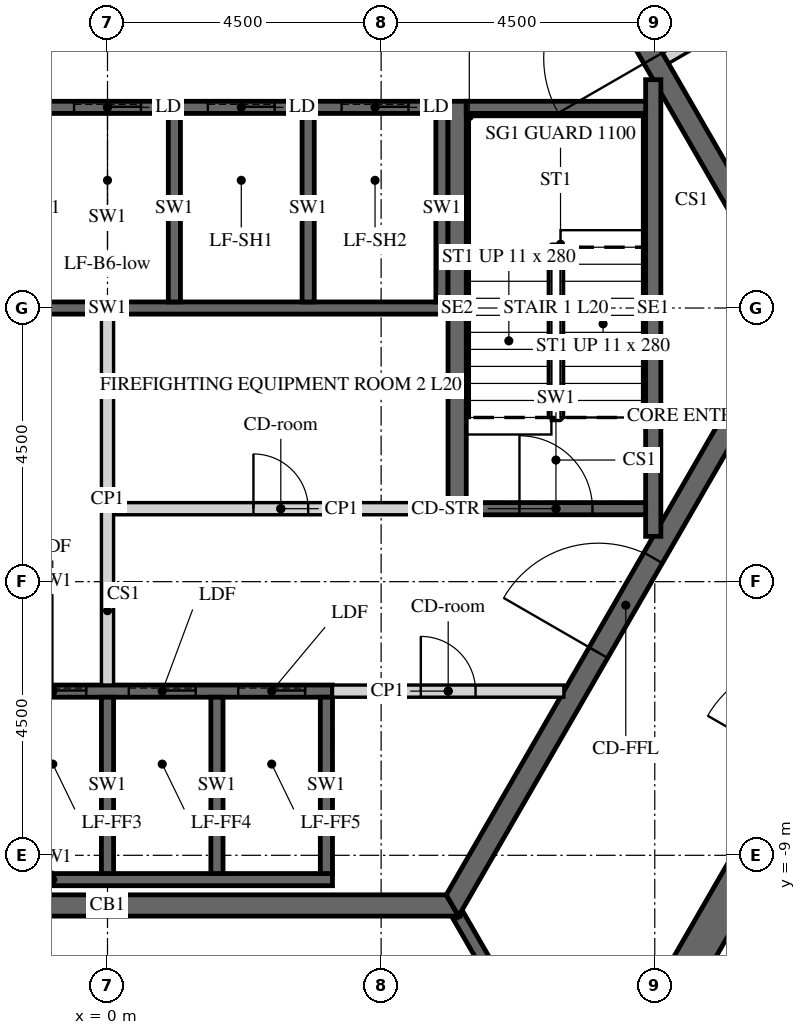
"""IFC4 building model, lengths in metres.
Left out: names, types, materials, properties, quantities, classifications, styles, units other than length and angle.
Written with IfcOpenShell. Run it as: python <this file> out.ifc"""

import sys

from ifc_helpers import new_model, si_unit, direction, frame, frame_2d, origin, place, context, subcontext, project, spatial, polyline, rectangle, outline, extrude, element, fill, save


model = new_model("IFC4")
c1 = context("Model", 3, precision=1e-05, world=origin(), true_north=direction((0.0, 1.0)))
c2 = subcontext(c1, "Body", "Model", "MODEL_VIEW")
j1 = project(units=[si_unit("LENGTHUNIT", "METRE"), si_unit("PLANEANGLEUNIT", "RADIAN")], contexts=[c1])
p1 = place(None, origin())
s1 = spatial("IfcSite", under=j1, at=p1, CompositionType="ELEMENT")
p2 = place(p1, origin())
s2 = spatial("IfcBuilding", under=s1, at=p2, CompositionType="ELEMENT")
p3 = place(p2, frame((0.0, 0.0, 92.1)))
s3 = spatial("IfcBuildingStorey", under=s2, at=p3, CompositionType="ELEMENT", Elevation=92.1)
p4 = place(p3, frame((7.91, -13.7, -0.15), z_axis=(0.0, 0.0, 1.0), x_axis=(0.499999880136, 0.866025472988, 0.0)))
e1 = element("IfcWall", 1, at=p4, inside=s3, PredefinedType="SHEAR", context=c2, shape_type="SweptSolid", body=[
    extrude(outline(polyline([(-0.173, -0.3), (15.993, -0.3), (15.646, 0.3), (0.173, 0.3), (-0.173, -0.3)])), origin(), (0.0, 0.0, 1.0), 3.9),
])
p5 = place(p4, frame((7.039, 0.0, 0.15)))
e2 = element("IfcOpeningElement", 2, at=p5, cuts=e1, PredefinedType="OPENING", context=c2, shape_type="SweptSolid", body=[
    extrude(rectangle(XDim=1.8, YDim=2.4, at=frame_2d((0.9, 1.2))), frame((0.0, 0.31, 0.0), z_axis=(0.0, -1.0, 0.0), x_axis=(1.0, 0.0, 0.0)), (0.0, 0.0, 1.0), 0.62),
])
p6 = place(p3, frame((15.819, 0.0, -0.15), z_axis=(0.0, 0.0, 1.0), x_axis=(-0.499999880136, 0.866025472988, 0.0)))
e3 = element("IfcWall", 3, at=p6, inside=s3, PredefinedType="SHEAR", context=c2, shape_type="SweptSolid", body=[
    extrude(outline(polyline([(-0.173, -0.3), (15.993, -0.3), (15.646, 0.3), (0.173, 0.3), (-0.173, -0.3)])), origin(), (0.0, 0.0, 1.0), 3.9),
])
p7 = place(p6, frame((6.981, 0.0, 0.15)))
e4 = element("IfcOpeningElement", 4, at=p7, cuts=e3, PredefinedType="OPENING", context=c2, shape_type="SweptSolid", body=[
    extrude(rectangle(XDim=1.8, YDim=2.4, at=frame_2d((0.9, 1.2))), frame((0.0, 0.31, 0.0), z_axis=(0.0, -1.0, 0.0), x_axis=(1.0, 0.0, 0.0)), (0.0, 0.0, 1.0), 0.62),
])
p8 = place(p3, frame((-5.673, -9.825, -0.15), z_axis=(0.0, 0.0, 1.0), x_axis=(1.0, 0.0, 0.0)))
e5 = element("IfcWall", 5, at=p8, inside=s3, PredefinedType="SHEAR", context=c2, shape_type="SweptSolid", body=[
    extrude(outline(polyline([(-0.101, -0.175), (11.446, -0.175), (11.244, 0.175), (0.101, 0.175), (-0.101, -0.175)])), origin(), (0.0, 0.0, 1.0), 3.9),
])
p9 = place(p3, frame((5.673, -9.825, -0.15), z_axis=(0.0, 0.0, 1.0), x_axis=(0.499995046907, 0.866028263435, 0.0)))
e6 = element("IfcWall", 6, at=p9, inside=s3, PredefinedType="SHEAR", context=c2, shape_type="SweptSolid", body=[
    extrude(outline(polyline([(-0.101, -0.175), (11.446, -0.175), (11.244, 0.175), (0.101, 0.175), (-0.101, -0.175)])), origin(), (0.0, 0.0, 1.0), 3.9),
])
p10 = place(p9, frame((4.801, 0.0, 0.15)))
e7 = element("IfcOpeningElement", 7, at=p10, cuts=e6, PredefinedType="OPENING", context=c2, shape_type="SweptSolid", body=[
    extrude(rectangle(XDim=1.8, YDim=2.4, at=frame_2d((0.9, 1.2))), frame((0.0, 0.185, 0.0), z_axis=(0.0, -1.0, 0.0), x_axis=(1.0, 0.0, 0.0)), (0.0, 0.0, 1.0), 0.37),
])
p11 = place(p3, frame((11.345, 0.0, -0.15), z_axis=(0.0, 0.0, 1.0), x_axis=(-0.499995046907, 0.866028263435, 0.0)))
e8 = element("IfcWall", 8, at=p11, inside=s3, PredefinedType="SHEAR", context=c2, shape_type="SweptSolid", body=[
    extrude(outline(polyline([(-0.101, -0.175), (11.446, -0.175), (11.244, 0.175), (0.101, 0.175), (-0.101, -0.175)])), origin(), (0.0, 0.0, 1.0), 3.9),
])
p12 = place(p11, frame((4.744, 0.0, 0.15)))
e9 = element("IfcOpeningElement", 9, at=p12, cuts=e8, PredefinedType="OPENING", context=c2, shape_type="SweptSolid", body=[
    extrude(rectangle(XDim=1.8, YDim=2.4, at=frame_2d((0.9, 1.2))), frame((0.0, 0.185, 0.0), z_axis=(0.0, -1.0, 0.0), x_axis=(1.0, 0.0, 0.0)), (0.0, 0.0, 1.0), 0.37),
])
p13 = place(p3, frame((-5.6, 3.3, -0.25), z_axis=(0.0, 0.0, 1.0), x_axis=(1.0, 0.0, 0.0)))
e10 = element("IfcWall", 10, at=p13, inside=s3, PredefinedType="SHEAR", context=c2, shape_type="SweptSolid", body=[
    extrude(rectangle(XDim=11.2, YDim=0.2, at=frame_2d((5.6, 0.0))), origin(), (0.0, 0.0, 1.0), 3.9),
])
p14 = place(p13, frame((0.65, 0.0, 0.25)))
e11 = element("IfcOpeningElement", 11, at=p14, cuts=e10, PredefinedType="OPENING", context=c2, shape_type="SweptSolid", body=[
    extrude(rectangle(XDim=1.1, YDim=2.1, at=frame_2d((0.55, 1.05))), frame((0.0, 0.11, 0.0), z_axis=(0.0, -1.0, 0.0), x_axis=(1.0, 0.0, 0.0)), (0.0, 0.0, 1.0), 0.22),
])
p15 = place(p13, frame((2.85, 0.0, 0.25)))
e12 = element("IfcOpeningElement", 12, at=p15, cuts=e10, PredefinedType="OPENING", context=c2, shape_type="SweptSolid", body=[
    extrude(rectangle(XDim=1.1, YDim=2.1, at=frame_2d((0.55, 1.05))), frame((0.0, 0.11, 0.0), z_axis=(0.0, -1.0, 0.0), x_axis=(1.0, 0.0, 0.0)), (0.0, 0.0, 1.0), 0.22),
])
p16 = place(p13, frame((5.05, 0.0, 0.25)))
e13 = element("IfcOpeningElement", 13, at=p16, cuts=e10, PredefinedType="OPENING", context=c2, shape_type="SweptSolid", body=[
    extrude(rectangle(XDim=1.1, YDim=2.1, at=frame_2d((0.55, 1.05))), frame((0.0, 0.11, 0.0), z_axis=(0.0, -1.0, 0.0), x_axis=(1.0, 0.0, 0.0)), (0.0, 0.0, 1.0), 0.22),
])
p17 = place(p13, frame((7.25, 0.0, 0.25)))
e14 = element("IfcOpeningElement", 14, at=p17, cuts=e10, PredefinedType="OPENING", context=c2, shape_type="SweptSolid", body=[
    extrude(rectangle(XDim=1.1, YDim=2.1, at=frame_2d((0.55, 1.05))), frame((0.0, 0.11, 0.0), z_axis=(0.0, -1.0, 0.0), x_axis=(1.0, 0.0, 0.0)), (0.0, 0.0, 1.0), 0.22),
])
p18 = place(p13, frame((9.45, 0.0, 0.25)))
e15 = element("IfcOpeningElement", 15, at=p18, cuts=e10, PredefinedType="OPENING", context=c2, shape_type="SweptSolid", body=[
    extrude(rectangle(XDim=1.1, YDim=2.1, at=frame_2d((0.55, 1.05))), frame((0.0, 0.11, 0.0), z_axis=(0.0, -1.0, 0.0), x_axis=(1.0, 0.0, 0.0)), (0.0, 0.0, 1.0), 0.22),
])
p19 = place(p3, frame((-5.6, 0.0, -0.25), z_axis=(0.0, 0.0, 1.0), x_axis=(1.0, 0.0, 0.0)))
e16 = element("IfcWall", 16, at=p19, inside=s3, PredefinedType="SHEAR", context=c2, shape_type="SweptSolid", body=[
    extrude(rectangle(XDim=11.2, YDim=0.2, at=frame_2d((5.6, 0.0))), origin(), (0.0, 0.0, 1.0), 3.9),
])
for number, where, z_axis, x_axis in (
    (17, (1.1, 0.1, -0.25), (0.0, 0.0, 1.0), (0.0, 1.0, 0.0)),
    (18, (3.3, 0.1, -0.25), (0.0, 0.0, 1.0), (0.0, 1.0, 0.0)),
    (19, (5.5, 0.1, -0.25), (0.0, 0.0, 1.0), (0.0, 1.0, 0.0)),
):
    element("IfcWall", number, at=place(p3, frame(where, z_axis=z_axis, x_axis=x_axis)), inside=s3, PredefinedType="SHEAR", context=c2, shape_type="SweptSolid", body=[
        extrude(rectangle(XDim=3.1, YDim=0.2, at=frame_2d((1.55, 0.0))), origin(), (0.0, 0.0, 1.0), 3.9),
    ])
p20 = place(p3, frame((-5.5, -6.3, -0.25), z_axis=(0.0, 0.0, 1.0), x_axis=(1.0, 0.0, 0.0)))
e20 = element("IfcWall", 20, at=p20, inside=s3, PredefinedType="SHEAR", context=c2, shape_type="SweptSolid", body=[
    extrude(rectangle(XDim=9.2, YDim=0.2, at=frame_2d((4.6, 0.0))), origin(), (0.0, 0.0, 1.0), 3.9),
])
p21 = place(p20, frame((0.45, 0.0, 0.25)))
e21 = element("IfcOpeningElement", 21, at=p21, cuts=e20, PredefinedType="OPENING", context=c2, shape_type="SweptSolid", body=[
    extrude(rectangle(XDim=1.1, YDim=2.1, at=frame_2d((0.55, 1.05))), frame((0.0, 0.11, 0.0), z_axis=(0.0, -1.0, 0.0), x_axis=(1.0, 0.0, 0.0)), (0.0, 0.0, 1.0), 0.22),
])
p22 = place(p20, frame((2.25, 0.0, 0.25)))
e22 = element("IfcOpeningElement", 22, at=p22, cuts=e20, PredefinedType="OPENING", context=c2, shape_type="SweptSolid", body=[
    extrude(rectangle(XDim=1.1, YDim=2.1, at=frame_2d((0.55, 1.05))), frame((0.0, 0.11, 0.0), z_axis=(0.0, -1.0, 0.0), x_axis=(1.0, 0.0, 0.0)), (0.0, 0.0, 1.0), 0.22),
])
p23 = place(p20, frame((4.05, 0.0, 0.25)))
e23 = element("IfcOpeningElement", 23, at=p23, cuts=e20, PredefinedType="OPENING", context=c2, shape_type="SweptSolid", body=[
    extrude(rectangle(XDim=1.1, YDim=2.1, at=frame_2d((0.55, 1.05))), frame((0.0, 0.11, 0.0), z_axis=(0.0, -1.0, 0.0), x_axis=(1.0, 0.0, 0.0)), (0.0, 0.0, 1.0), 0.22),
])
p24 = place(p20, frame((5.85, 0.0, 0.25)))
e24 = element("IfcOpeningElement", 24, at=p24, cuts=e20, PredefinedType="OPENING", context=c2, shape_type="SweptSolid", body=[
    extrude(rectangle(XDim=1.1, YDim=2.1, at=frame_2d((0.55, 1.05))), frame((0.0, 0.11, 0.0), z_axis=(0.0, -1.0, 0.0), x_axis=(1.0, 0.0, 0.0)), (0.0, 0.0, 1.0), 0.22),
])
p25 = place(p20, frame((7.65, 0.0, 0.25)))
e25 = element("IfcOpeningElement", 25, at=p25, cuts=e20, PredefinedType="OPENING", context=c2, shape_type="SweptSolid", body=[
    extrude(rectangle(XDim=1.1, YDim=2.1, at=frame_2d((0.55, 1.05))), frame((0.0, 0.11, 0.0), z_axis=(0.0, -1.0, 0.0), x_axis=(1.0, 0.0, 0.0)), (0.0, 0.0, 1.0), 0.22),
])
p26 = place(p3, frame((-5.5, -9.4, -0.25), z_axis=(0.0, 0.0, 1.0), x_axis=(1.0, 0.0, 0.0)))
e26 = element("IfcWall", 26, at=p26, inside=s3, PredefinedType="SHEAR", context=c2, shape_type="SweptSolid", body=[
    extrude(rectangle(XDim=9.2, YDim=0.2, at=frame_2d((4.6, 0.0))), origin(), (0.0, 0.0, 1.0), 3.9),
])
for number, where, z_axis, x_axis in (
    (27, (0.0, -9.3, -0.25), (0.0, 0.0, 1.0), (0.0, 1.0, 0.0)),
    (28, (1.8, -9.3, -0.25), (0.0, 0.0, 1.0), (0.0, 1.0, 0.0)),
    (29, (3.6, -9.3, -0.25), (0.0, 0.0, 1.0), (0.0, 1.0, 0.0)),
):
    element("IfcWall", number, at=place(p3, frame(where, z_axis=z_axis, x_axis=x_axis)), inside=s3, PredefinedType="SHEAR", context=c2, shape_type="SweptSolid", body=[
        extrude(rectangle(XDim=2.9, YDim=0.2, at=frame_2d((1.45, 0.0))), origin(), (0.0, 0.0, 1.0), 3.9),
    ])
p27 = place(p3, frame((0.1, -3.3, 0.0), z_axis=(0.0, 0.0, 1.0), x_axis=(1.0, 0.0, 0.0)))
e30 = element("IfcWall", 30, at=p27, inside=s3, PredefinedType="PARTITIONING", context=c2, shape_type="SweptSolid", body=[
    extrude(rectangle(XDim=5.5, YDim=0.2, at=frame_2d((2.75, 0.0))), origin(), (0.0, 0.0, 1.0), 3.65),
])
p28 = place(p27, frame((2.3, 0.0, 0.0)))
e31 = element("IfcOpeningElement", 31, at=p28, cuts=e30, PredefinedType="OPENING", context=c2, shape_type="SweptSolid", body=[
    extrude(rectangle(XDim=0.9, YDim=2.1, at=frame_2d((0.45, 1.05))), frame((0.0, 0.11, 0.0), z_axis=(0.0, -1.0, 0.0), x_axis=(1.0, 0.0, 0.0)), (0.0, 0.0, 1.0), 0.22),
])
p29 = place(p3, frame((0.0, -6.2, 0.0), z_axis=(0.0, 0.0, 1.0), x_axis=(0.0, 1.0, 0.0)))
e32 = element("IfcWall", 32, at=p29, inside=s3, PredefinedType="PARTITIONING", context=c2, shape_type="SweptSolid", body=[
    extrude(rectangle(XDim=6.1, YDim=0.2, at=frame_2d((3.05, 0.0))), origin(), (0.0, 0.0, 1.0), 3.65),
])
p30 = place(p3, frame((3.7, -6.3, 0.0), z_axis=(0.0, 0.0, 1.0), x_axis=(1.0, 0.0, 0.0)))
e33 = element("IfcWall", 33, at=p30, inside=s3, PredefinedType="PARTITIONING", context=c2, shape_type="SweptSolid", body=[
    extrude(rectangle(XDim=3.806, YDim=0.2, at=frame_2d((1.903, 0.0))), origin(), (0.0, 0.0, 1.0), 3.65),
])
p31 = place(p30, frame((1.453, 0.0, 0.0)))
e34 = element("IfcOpeningElement", 34, at=p31, cuts=e33, PredefinedType="OPENING", context=c2, shape_type="SweptSolid", body=[
    extrude(rectangle(XDim=0.9, YDim=2.1, at=frame_2d((0.45, 1.05))), frame((0.0, 0.11, 0.0), z_axis=(0.0, -1.0, 0.0), x_axis=(1.0, 0.0, 0.0)), (0.0, 0.0, 1.0), 0.22),
])
p32 = place(p3, frame((5.773, -10.0, -0.15), z_axis=(0.0, 0.0, 1.0), x_axis=(0.500038251005, -0.86600331843, 0.0)))
e35 = element("IfcWall", 35, at=p32, inside=s3, PredefinedType="SHEAR", context=c2, shape_type="SweptSolid", body=[
    extrude(rectangle(XDim=3.926, YDim=0.2, at=frame_2d((1.963, 0.0))), origin(), (0.0, 0.0, 1.0), 3.9),
])
p33 = place(p3, frame((9.175, 4.109, 0.0), z_axis=(0.0, 0.0, 1.0), x_axis=(0.865989465428, 0.500062241894, 0.0)))
e36 = element("IfcWall", 36, at=p33, inside=s3, PredefinedType="PARTITIONING", context=c2, shape_type="SweptSolid", body=[
    extrude(rectangle(XDim=3.4, YDim=0.2, at=frame_2d((1.7, 0.0))), origin(), (0.0, 0.0, 1.0), 3.65),
])
p34 = place(p33, frame((1.351, 0.0, 0.0)))
e37 = element("IfcOpeningElement", 37, at=p34, cuts=e36, PredefinedType="OPENING", context=c2, shape_type="SweptSolid", body=[
    extrude(rectangle(XDim=0.9, YDim=2.1, at=frame_2d((0.45, 1.05))), frame((0.0, 0.11, 0.0), z_axis=(0.0, -1.0, 0.0), x_axis=(1.0, 0.0, 0.0)), (0.0, 0.0, 1.0), 0.22),
])
p35 = place(p3, frame((5.75, -3.4, -0.25), z_axis=(0.0, 0.0, 1.0), x_axis=(0.0, 1.0, 0.0)))
e38 = element("IfcWall", 38, at=p35, inside=s3, PredefinedType="SHEAR", context=c2, shape_type="SweptSolid", body=[
    extrude(rectangle(XDim=6.8, YDim=0.3, at=frame_2d((3.4, 0.0))), origin(), (0.0, 0.0, 1.0), 3.9),
])
p36 = place(p3, frame((8.975, -3.755, -0.25), z_axis=(0.0, 0.0, 1.0), x_axis=(0.0, 1.0, 0.0)))
e39 = element("IfcWall", 39, at=p36, inside=s3, PredefinedType="SHEAR", context=c2, shape_type="SweptSolid", body=[
    extrude(rectangle(XDim=7.51, YDim=0.25, at=frame_2d((3.755, 0.0))), origin(), (0.0, 0.0, 1.0), 3.9),
])
p37 = place(p3, frame((5.9, 3.3, -0.25), z_axis=(0.0, 0.0, 1.0), x_axis=(1.0, 0.0, 0.0)))
e40 = element("IfcWall", 40, at=p37, inside=s3, PredefinedType="SHEAR", context=c2, shape_type="SweptSolid", body=[
    extrude(rectangle(XDim=2.95, YDim=0.2, at=frame_2d((1.475, 0.0))), origin(), (0.0, 0.0, 1.0), 3.9),
])
p38 = place(p3, frame((5.9, -3.3, -0.25), z_axis=(0.0, 0.0, 1.0), x_axis=(1.0, 0.0, 0.0)))
e41 = element("IfcWall", 41, at=p38, inside=s3, PredefinedType="SHEAR", context=c2, shape_type="SweptSolid", body=[
    extrude(rectangle(XDim=2.95, YDim=0.2, at=frame_2d((1.475, 0.0))), origin(), (0.0, 0.0, 1.0), 3.9),
])
p39 = place(p38, frame((0.875, 0.0, 0.25)))
e42 = element("IfcOpeningElement", 42, at=p39, cuts=e41, PredefinedType="OPENING", context=c2, shape_type="SweptSolid", body=[
    extrude(rectangle(XDim=1.2, YDim=2.4, at=frame_2d((0.6, 1.2))), frame((0.0, 0.11, 0.0), z_axis=(0.0, -1.0, 0.0), x_axis=(1.0, 0.0, 0.0)), (0.0, 0.0, 1.0), 0.22),
])
p40 = place(p12, origin())
e43 = element("IfcDoor", 43, at=p40, inside=s3, OperationType="DOUBLE_DOOR_SINGLE_SWING", PredefinedType="DOOR", context=c2, shape_type="SweptSolid", body=[
    extrude(rectangle(XDim=1.8, YDim=2.4, at=frame_2d((0.9, 1.2))), frame((0.0, 0.025, 0.0), z_axis=(0.0, -1.0, 0.0), x_axis=(1.0, 0.0, 0.0)), (0.0, 0.0, 1.0), 0.05),
])
fill(e9, e43)
p41 = place(p10, origin())
e44 = element("IfcDoor", 44, at=p41, inside=s3, OperationType="DOUBLE_DOOR_SINGLE_SWING", PredefinedType="DOOR", context=c2, shape_type="SweptSolid", body=[
    extrude(rectangle(XDim=1.8, YDim=2.4, at=frame_2d((0.9, 1.2))), frame((0.0, 0.025, 0.0), z_axis=(0.0, -1.0, 0.0), x_axis=(1.0, 0.0, 0.0)), (0.0, 0.0, 1.0), 0.05),
])
fill(e7, e44)
p42 = place(p28, origin())
e45 = element("IfcDoor", 45, at=p42, inside=s3, OperationType="SINGLE_SWING_LEFT", PredefinedType="DOOR", context=c2, shape_type="SweptSolid", body=[
    extrude(rectangle(XDim=0.9, YDim=2.1, at=frame_2d((0.45, 1.05))), frame((0.0, 0.025, 0.0), z_axis=(0.0, -1.0, 0.0), x_axis=(1.0, 0.0, 0.0)), (0.0, 0.0, 1.0), 0.05),
])
fill(e31, e45)
p43 = place(p31, origin())
e46 = element("IfcDoor", 46, at=p43, inside=s3, OperationType="SINGLE_SWING_LEFT", PredefinedType="DOOR", context=c2, shape_type="SweptSolid", body=[
    extrude(rectangle(XDim=0.9, YDim=2.1, at=frame_2d((0.45, 1.05))), frame((0.0, 0.025, 0.0), z_axis=(0.0, -1.0, 0.0), x_axis=(1.0, 0.0, 0.0)), (0.0, 0.0, 1.0), 0.05),
])
fill(e34, e46)
p44 = place(p39, origin())
e47 = element("IfcDoor", 47, at=p44, inside=s3, OperationType="SINGLE_SWING_LEFT", PredefinedType="DOOR", context=c2, shape_type="SweptSolid", body=[
    extrude(rectangle(XDim=1.2, YDim=2.4, at=frame_2d((0.6, 1.2))), frame((0.0, 0.025, 0.0), z_axis=(0.0, -1.0, 0.0), x_axis=(1.0, 0.0, 0.0)), (0.0, 0.0, 1.0), 0.05),
])
fill(e42, e47)
p45 = place(p16, origin())
e48 = element("IfcDoor", 48, at=p45, inside=s3, OperationType="SLIDING_TO_LEFT", PredefinedType="DOOR", context=c2, shape_type="SweptSolid", body=[
    extrude(rectangle(XDim=1.1, YDim=2.1, at=frame_2d((0.55, 1.05))), frame((0.0, 0.025, 0.0), z_axis=(0.0, -1.0, 0.0), x_axis=(1.0, 0.0, 0.0)), (0.0, 0.0, 1.0), 0.05),
])
fill(e13, e48)
p46 = place(p17, origin())
e49 = element("IfcDoor", 49, at=p46, inside=s3, OperationType="SLIDING_TO_LEFT", PredefinedType="DOOR", context=c2, shape_type="SweptSolid", body=[
    extrude(rectangle(XDim=1.1, YDim=2.1, at=frame_2d((0.55, 1.05))), frame((0.0, 0.025, 0.0), z_axis=(0.0, -1.0, 0.0), x_axis=(1.0, 0.0, 0.0)), (0.0, 0.0, 1.0), 0.05),
])
fill(e14, e49)
p47 = place(p18, origin())
e50 = element("IfcDoor", 50, at=p47, inside=s3, OperationType="SLIDING_TO_LEFT", PredefinedType="DOOR", context=c2, shape_type="SweptSolid", body=[
    extrude(rectangle(XDim=1.1, YDim=2.1, at=frame_2d((0.55, 1.05))), frame((0.0, 0.025, 0.0), z_axis=(0.0, -1.0, 0.0), x_axis=(1.0, 0.0, 0.0)), (0.0, 0.0, 1.0), 0.05),
])
fill(e15, e50)
p48 = place(p23, origin())
e51 = element("IfcDoor", 51, at=p48, inside=s3, OperationType="SLIDING_TO_LEFT", PredefinedType="DOOR", context=c2, shape_type="SweptSolid", body=[
    extrude(rectangle(XDim=1.1, YDim=2.1, at=frame_2d((0.55, 1.05))), frame((0.0, 0.025, 0.0), z_axis=(0.0, -1.0, 0.0), x_axis=(1.0, 0.0, 0.0)), (0.0, 0.0, 1.0), 0.05),
])
fill(e23, e51)
p49 = place(p24, origin())
e52 = element("IfcDoor", 52, at=p49, inside=s3, OperationType="SLIDING_TO_LEFT", PredefinedType="DOOR", context=c2, shape_type="SweptSolid", body=[
    extrude(rectangle(XDim=1.1, YDim=2.1, at=frame_2d((0.55, 1.05))), frame((0.0, 0.025, 0.0), z_axis=(0.0, -1.0, 0.0), x_axis=(1.0, 0.0, 0.0)), (0.0, 0.0, 1.0), 0.05),
])
fill(e24, e52)
p50 = place(p25, origin())
e53 = element("IfcDoor", 53, at=p50, inside=s3, OperationType="SLIDING_TO_LEFT", PredefinedType="DOOR", context=c2, shape_type="SweptSolid", body=[
    extrude(rectangle(XDim=1.1, YDim=2.1, at=frame_2d((0.55, 1.05))), frame((0.0, 0.025, 0.0), z_axis=(0.0, -1.0, 0.0), x_axis=(1.0, 0.0, 0.0)), (0.0, 0.0, 1.0), 0.05),
])
fill(e25, e53)
save(model, sys.argv[1])
